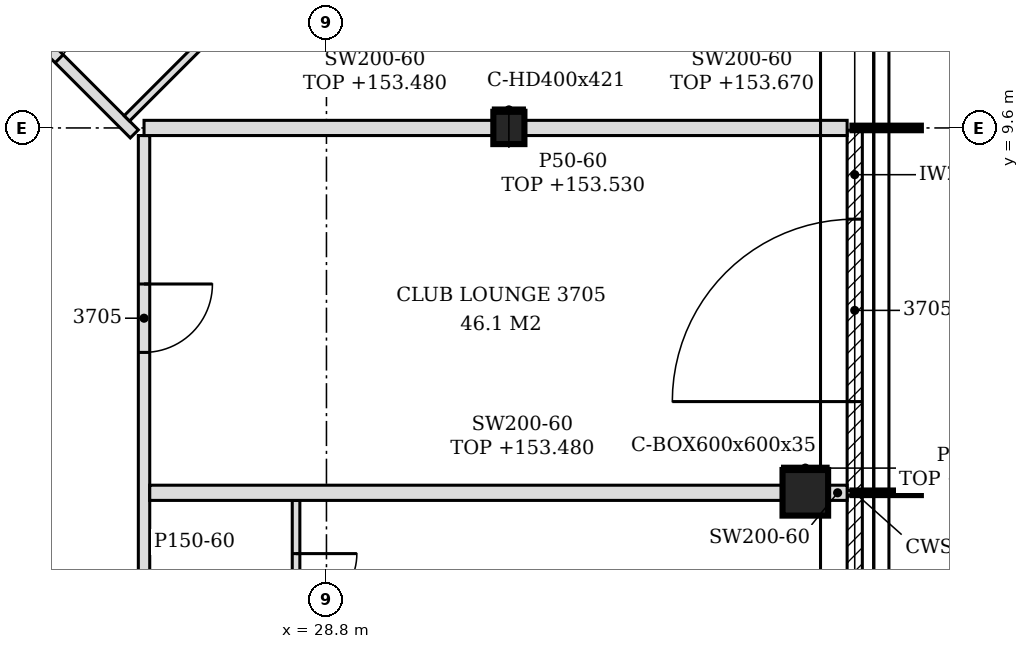
"""IFC4 building model, lengths in metres.
Left out: names, types, materials, properties, quantities, classifications, styles, units other than length and angle.
Written with IfcOpenShell. Run it as: python <this file> out.ifc"""

import sys

from ifc_helpers import new_model, si_unit, direction, frame, frame_2d, origin, origin_2d, place, context, subcontext, project, spatial, polyline, rectangle, hollow_rectangle, i_section, outline, extrude, element, fill, save


model = new_model("IFC4")
c1 = context("Model", 3, precision=1e-05, world=origin(), true_north=direction((0.0, 1.0)))
c2 = subcontext(c1, "Body", "Model", "MODEL_VIEW")
j1 = project(units=[si_unit("LENGTHUNIT", "METRE"), si_unit("PLANEANGLEUNIT", "RADIAN")], contexts=[c1])
p1 = place(None, origin())
s1 = spatial("IfcSite", under=j1, at=p1, CompositionType="ELEMENT")
p2 = place(p1, origin())
s2 = spatial("IfcBuilding", under=s1, at=p2, CompositionType="ELEMENT")
p3 = place(p2, frame((0.0, 0.0, 150.6)))
s3 = spatial("IfcBuildingStorey", under=s2, at=p3, CompositionType="ELEMENT", Elevation=150.6)
p4 = place(p3, frame((35.1, 4.8, -0.15), z_axis=(0.0, 0.0, 1.0), x_axis=(1.0, 0.0, 0.0)))
e1 = element("IfcColumn", 1, at=p4, inside=s3, PredefinedType="COLUMN", context=c2, shape_type="SweptSolid", body=[
    extrude(hollow_rectangle(XDim=0.6, YDim=0.6, WallThickness=0.035, at=origin_2d()), origin(), (0.0, 0.0, 1.0), 3.6),
])
p5 = place(p3, frame((31.2, 9.6, -0.15), z_axis=(0.0, 0.0, 1.0), x_axis=(1.0, 0.0, 0.0)))
e2 = element("IfcColumn", 2, at=p5, inside=s3, PredefinedType="COLUMN", context=c2, shape_type="SweptSolid", body=[
    extrude(i_section(OverallWidth=0.409, OverallDepth=0.425, WebThickness=0.033, FlangeThickness=0.052, FilletRadius=0.015, at=origin_2d()), origin(), (0.0, 0.0, 1.0), 3.6),
])
p6 = place(p3, frame((35.75, 0.03, 0.0), z_axis=(0.0, 0.0, 1.0), x_axis=(0.0, 1.0, 0.0)))
e3 = element("IfcWall", 3, at=p6, inside=s3, PredefinedType="NOTDEFINED", context=c2, shape_type="SweptSolid", body=[
    extrude(rectangle(XDim=4.74, YDim=0.2, at=frame_2d((2.37, 0.0))), origin(), (0.0, 0.0, 1.0), 3.45),
])
p7 = place(p6, frame((1.17, 0.0, 0.0)))
e4 = element("IfcOpeningElement", 4, at=p7, cuts=e3, PredefinedType="OPENING", context=c2, shape_type="SweptSolid", body=[
    extrude(rectangle(XDim=2.4, YDim=2.4, at=frame_2d((1.2, 1.2))), frame((0.0, 0.11, 0.0), z_axis=(0.0, -1.0, 0.0), x_axis=(1.0, 0.0, 0.0)), (0.0, 0.0, 1.0), 0.22),
])
p8 = place(p3, frame((35.75, 4.83, 0.0), z_axis=(0.0, 0.0, 1.0), x_axis=(0.0, 1.0, 0.0)))
e5 = element("IfcWall", 5, at=p8, inside=s3, PredefinedType="NOTDEFINED", context=c2, shape_type="SweptSolid", body=[
    extrude(rectangle(XDim=4.74, YDim=0.2, at=frame_2d((2.37, 0.0))), origin(), (0.0, 0.0, 1.0), 3.45),
])
p9 = place(p8, frame((1.17, 0.0, 0.0)))
e6 = element("IfcOpeningElement", 6, at=p9, cuts=e5, PredefinedType="OPENING", context=c2, shape_type="SweptSolid", body=[
    extrude(rectangle(XDim=2.4, YDim=2.4, at=frame_2d((1.2, 1.2))), frame((0.0, 0.11, 0.0), z_axis=(0.0, -1.0, 0.0), x_axis=(1.0, 0.0, 0.0)), (0.0, 0.0, 1.0), 0.22),
])
p10 = place(p3, frame((26.4, -4.448, 0.0), z_axis=(0.0, 0.0, 1.0), x_axis=(0.0, 1.0, 0.0)))
e7 = element("IfcWall", 7, at=p10, inside=s3, PredefinedType="PARTITIONING", context=c2, shape_type="SweptSolid", body=[
    extrude(outline(polyline([(0.0, 0.0), (13.948, 0.0), (13.948, 2.88), (13.943, 2.88), (13.941, 3.45), (9.353, 3.45), (9.351, 2.88), (9.143, 2.88), (9.141, 3.45), (4.553, 3.45), (4.551, 2.88), (4.343, 2.88), (4.341, 3.45), (0.0, 3.45), (0.0, 0.0)])), frame((0.0, 0.075, 0.0), z_axis=(0.0, -1.0, 0.0), x_axis=(1.0, 0.0, 0.0)), (0.0, 0.0, 1.0), 0.15),
])
p11 = place(p10, frame((1.701, 0.0, 0.0)))
e8 = element("IfcOpeningElement", 8, at=p11, cuts=e7, PredefinedType="OPENING", context=c2, shape_type="SweptSolid", body=[
    extrude(rectangle(XDim=0.9, YDim=2.1, at=frame_2d((0.45, 1.05))), frame((0.0, 0.085, 0.0), z_axis=(0.0, -1.0, 0.0), x_axis=(1.0, 0.0, 0.0)), (0.0, 0.0, 1.0), 0.17),
])
p12 = place(p10, frame((5.198, 0.0, 0.0)))
e9 = element("IfcOpeningElement", 9, at=p12, cuts=e7, PredefinedType="OPENING", context=c2, shape_type="SweptSolid", body=[
    extrude(rectangle(XDim=0.9, YDim=2.1, at=frame_2d((0.45, 1.05))), frame((0.0, 0.085, 0.0), z_axis=(0.0, -1.0, 0.0), x_axis=(1.0, 0.0, 0.0)), (0.0, 0.0, 1.0), 0.17),
])
p13 = place(p10, frame((11.095, 0.0, 0.0)))
e10 = element("IfcOpeningElement", 10, at=p13, cuts=e7, PredefinedType="OPENING", context=c2, shape_type="SweptSolid", body=[
    extrude(rectangle(XDim=0.9, YDim=2.1, at=frame_2d((0.45, 1.05))), frame((0.0, 0.085, 0.0), z_axis=(0.0, -1.0, 0.0), x_axis=(1.0, 0.0, 0.0)), (0.0, 0.0, 1.0), 0.17),
])
p14 = place(p3, frame((28.4, 2.45, 0.0), z_axis=(0.0, 0.0, 1.0), x_axis=(0.0, 1.0, 0.0)))
e11 = element("IfcWall", 11, at=p14, inside=s3, PredefinedType="PARTITIONING", context=c2, shape_type="SweptSolid", body=[
    extrude(outline(polyline([(0.0, 0.0), (2.25, 0.0), (2.25, 2.88), (2.245, 2.88), (2.243, 3.45), (0.0, 3.45), (0.0, 0.0)])), frame((0.0, 0.05, 0.0), z_axis=(0.0, -1.0, 0.0), x_axis=(1.0, 0.0, 0.0)), (0.0, 0.0, 1.0), 0.1),
])
p15 = place(p14, frame((0.75, 0.0, 0.0)))
e12 = element("IfcOpeningElement", 12, at=p15, cuts=e11, PredefinedType="OPENING", context=c2, shape_type="SweptSolid", body=[
    extrude(rectangle(XDim=0.8, YDim=2.1, at=frame_2d((0.4, 1.05))), frame((0.0, 0.06, 0.0), z_axis=(0.0, -1.0, 0.0), x_axis=(1.0, 0.0, 0.0)), (0.0, 0.0, 1.0), 0.12),
])
p16 = place(p3, frame((26.475, 4.8, 0.0), z_axis=(0.0, 0.0, 1.0), x_axis=(1.0, 0.0, 0.0)))
e13 = element("IfcWall", 13, at=p16, inside=s3, PredefinedType="PARTITIONING", context=c2, shape_type="SweptSolid", body=[
    extrude(rectangle(XDim=8.325, YDim=0.2, at=frame_2d((4.163, 0.0))), origin(), (0.0, 0.0, 1.0), 2.88),
])
p17 = place(p3, frame((35.4, 4.8, 0.0), z_axis=(0.0, 0.0, 1.0), x_axis=(1.0, 0.0, 0.0)))
e14 = element("IfcWall", 14, at=p17, inside=s3, PredefinedType="PARTITIONING", context=c2, shape_type="SweptSolid", body=[
    extrude(rectangle(XDim=0.25, YDim=0.2, at=frame_2d((0.125, 0.0))), origin(), (0.0, 0.0, 1.0), 3.45),
])
p18 = place(p3, frame((26.272, 9.522, 0.0), z_axis=(0.0, 0.0, 1.0), x_axis=(-0.707097742657, 0.707115819601, 0.0)))
e15 = element("IfcWall", 15, at=p18, inside=s3, PredefinedType="PARTITIONING", context=c2, shape_type="SweptSolid", body=[
    extrude(rectangle(XDim=13.506, YDim=0.15, at=frame_2d((6.753, 0.0))), origin(), (0.0, 0.0, 1.0), 2.73),
])
p19 = place(p18, frame((1.398, 0.0, 0.0)))
e16 = element("IfcOpeningElement", 16, at=p19, cuts=e15, PredefinedType="OPENING", context=c2, shape_type="SweptSolid", body=[
    extrude(rectangle(XDim=0.9, YDim=2.1, at=frame_2d((0.45, 1.05))), frame((0.0, 0.085, 0.0), z_axis=(0.0, -1.0, 0.0), x_axis=(1.0, 0.0, 0.0)), (0.0, 0.0, 1.0), 0.17),
])
p20 = place(p18, frame((4.668, 0.0, 0.0)))
e17 = element("IfcOpeningElement", 17, at=p20, cuts=e15, PredefinedType="OPENING", context=c2, shape_type="SweptSolid", body=[
    extrude(rectangle(XDim=0.9, YDim=2.1, at=frame_2d((0.45, 1.05))), frame((0.0, 0.085, 0.0), z_axis=(0.0, -1.0, 0.0), x_axis=(1.0, 0.0, 0.0)), (0.0, 0.0, 1.0), 0.17),
])
p21 = place(p18, frame((7.938, 0.0, 0.0)))
e18 = element("IfcOpeningElement", 18, at=p21, cuts=e15, PredefinedType="OPENING", context=c2, shape_type="SweptSolid", body=[
    extrude(rectangle(XDim=0.9, YDim=2.1, at=frame_2d((0.45, 1.05))), frame((0.0, 0.085, 0.0), z_axis=(0.0, -1.0, 0.0), x_axis=(1.0, 0.0, 0.0)), (0.0, 0.0, 1.0), 0.17),
])
p22 = place(p18, frame((11.405, 0.0, 0.0)))
e19 = element("IfcOpeningElement", 19, at=p22, cuts=e15, PredefinedType="OPENING", context=c2, shape_type="SweptSolid", body=[
    extrude(rectangle(XDim=0.9, YDim=2.1, at=frame_2d((0.45, 1.05))), frame((0.0, 0.085, 0.0), z_axis=(0.0, -1.0, 0.0), x_axis=(1.0, 0.0, 0.0)), (0.0, 0.0, 1.0), 0.17),
])
p23 = place(p3, frame((26.4, 9.6, 0.0), z_axis=(0.0, 0.0, 1.0), x_axis=(1.0, 0.0, 0.0)))
e20 = element("IfcWall", 20, at=p23, inside=s3, PredefinedType="PARTITIONING", context=c2, shape_type="SweptSolid", body=[
    extrude(rectangle(XDim=4.595, YDim=0.2, at=frame_2d((2.298, 0.0))), origin(), (0.0, 0.0, 1.0), 2.88),
])
p24 = place(p3, frame((31.405, 9.6, 0.0), z_axis=(0.0, 0.0, 1.0), x_axis=(1.0, 0.0, 0.0)))
e21 = element("IfcWall", 21, at=p24, inside=s3, PredefinedType="PARTITIONING", context=c2, shape_type="SweptSolid", body=[
    extrude(outline(polyline([(0.0, 0.0), (4.245, 0.0), (4.246, 3.07), (3.845, 3.07), (3.844, 2.93), (3.545, 2.93), (3.543, 3.07), (0.0, 3.07), (0.0, 0.0)])), frame((0.0, 0.1, 0.0), z_axis=(0.0, -1.0, 0.0), x_axis=(1.0, 0.0, 0.0)), (0.0, 0.0, 1.0), 0.2),
])
p25 = place(p3, frame((26.174, 9.726, 0.0), z_axis=(0.0, 0.0, 1.0), x_axis=(0.707106781187, 0.707106781187, 0.0)))
e22 = element("IfcWall", 22, at=p25, inside=s3, PredefinedType="PARTITIONING", context=c2, shape_type="SweptSolid", body=[
    extrude(rectangle(XDim=9.873, YDim=0.1, at=frame_2d((4.937, 0.0))), origin(), (0.0, 0.0, 1.0), 2.88),
])
p26 = place(p25, frame((4.639, 0.0, 0.0)))
e23 = element("IfcOpeningElement", 23, at=p26, cuts=e22, PredefinedType="OPENING", context=c2, shape_type="SweptSolid", body=[
    extrude(rectangle(XDim=0.9, YDim=2.1, at=frame_2d((0.45, 1.05))), frame((0.0, 0.06, 0.0), z_axis=(0.0, -1.0, 0.0), x_axis=(1.0, 0.0, 0.0)), (0.0, 0.0, 1.0), 0.12),
])
p27 = place(p3, frame((34.8, 5.125, 0.0), z_axis=(0.0, 0.0, 1.0), x_axis=(1.0, 0.0, 0.0)))
e24 = element("IfcWall", 24, at=p27, inside=s3, PredefinedType="PARTITIONING", context=c2, shape_type="SweptSolid", body=[
    extrude(rectangle(XDim=0.6, YDim=0.05, at=frame_2d((0.3, 0.0))), origin(), (0.0, 0.0, 1.0), 2.93),
])
p28 = place(p3, frame((30.996, 9.837, 0.0), z_axis=(0.0, 0.0, 1.0), x_axis=(1.0, 0.0, 0.0)))
e25 = element("IfcWall", 25, at=p28, inside=s3, PredefinedType="PARTITIONING", context=c2, shape_type="SweptSolid", body=[
    extrude(rectangle(XDim=0.409, YDim=0.05, at=frame_2d((0.205, 0.0))), origin(), (0.0, 0.0, 1.0), 2.93),
])
p29 = place(p9, origin())
e26 = element("IfcDoor", 26, at=p29, inside=s3, OperationType="SINGLE_SWING_LEFT", PredefinedType="DOOR", context=c2, shape_type="SweptSolid", body=[
    extrude(rectangle(XDim=2.4, YDim=2.4, at=frame_2d((1.2, 1.2))), frame((0.0, 0.025, 0.0), z_axis=(0.0, -1.0, 0.0), x_axis=(1.0, 0.0, 0.0)), (0.0, 0.0, 1.0), 0.05),
])
fill(e6, e26)
p30 = place(p15, frame((0.8, 0.0, 0.0), z_axis=(0.0, 0.0, 1.0), x_axis=(-1.0, 0.0, 0.0)))
e27 = element("IfcDoor", 27, at=p30, inside=s3, OperationType="SINGLE_SWING_LEFT", PredefinedType="DOOR", context=c2, shape_type="SweptSolid", body=[
    extrude(rectangle(XDim=0.8, YDim=2.1, at=frame_2d((0.4, 1.05))), frame((0.0, 0.025, 0.0), z_axis=(0.0, -1.0, 0.0), x_axis=(1.0, 0.0, 0.0)), (0.0, 0.0, 1.0), 0.05),
])
fill(e12, e27)
p31 = place(p13, frame((0.9, 0.0, 0.0), z_axis=(0.0, 0.0, 1.0), x_axis=(-1.0, 0.0, 0.0)))
e28 = element("IfcDoor", 28, at=p31, inside=s3, OperationType="SINGLE_SWING_LEFT", PredefinedType="DOOR", context=c2, shape_type="SweptSolid", body=[
    extrude(rectangle(XDim=0.9, YDim=2.1, at=frame_2d((0.45, 1.05))), frame((0.0, 0.025, 0.0), z_axis=(0.0, -1.0, 0.0), x_axis=(1.0, 0.0, 0.0)), (0.0, 0.0, 1.0), 0.05),
])
fill(e10, e28)
p32 = place(p19, frame((0.9, 0.0, 0.0), z_axis=(0.0, 0.0, 1.0), x_axis=(-1.0, 0.0, 0.0)))
e29 = element("IfcDoor", 29, at=p32, inside=s3, OperationType="SINGLE_SWING_LEFT", PredefinedType="DOOR", context=c2, shape_type="SweptSolid", body=[
    extrude(rectangle(XDim=0.9, YDim=2.1, at=frame_2d((0.45, 1.05))), frame((0.0, 0.025, 0.0), z_axis=(0.0, -1.0, 0.0), x_axis=(1.0, 0.0, 0.0)), (0.0, 0.0, 1.0), 0.05),
])
fill(e16, e29)
save(model, sys.argv[1])
